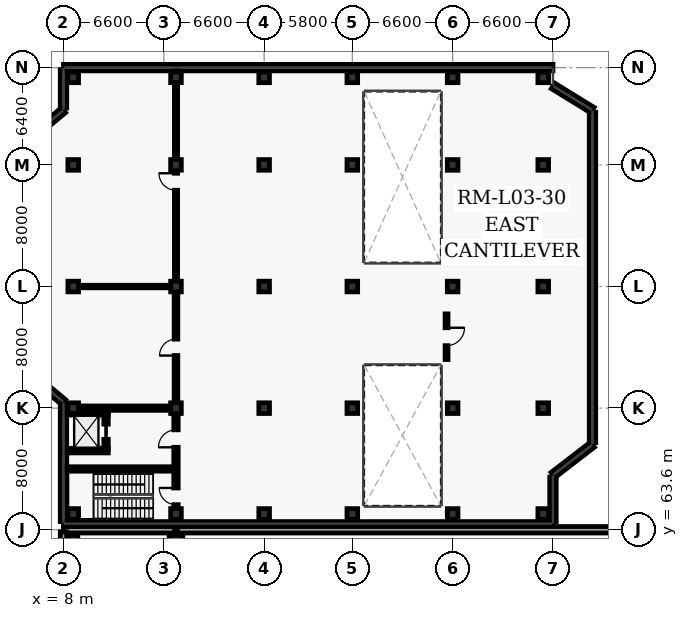
"""IFC4 building model, lengths in metres.
Left out: names, types, materials, properties, quantities, classifications, styles, units other than length and angle.
Written with IfcOpenShell. Run it as: python <this file> out.ifc"""

import sys

from ifc_helpers import new_model, si_unit, direction, frame, frame_2d, origin, origin_2d, place, context, subcontext, project, spatial, rectangle, extrude, element, fill, save


model = new_model("IFC4")
c1 = context("Model", 3, precision=1e-05, world=origin(), true_north=direction((0.0, 1.0)))
c2 = subcontext(c1, "Body", "Model", "MODEL_VIEW")
j1 = project(units=[si_unit("LENGTHUNIT", "METRE"), si_unit("PLANEANGLEUNIT", "RADIAN")], contexts=[c1])
p1 = place(None, origin())
s1 = spatial("IfcSite", under=j1, at=p1, CompositionType="ELEMENT")
p2 = place(p1, origin())
s2 = spatial("IfcBuilding", under=s1, at=p2, CompositionType="ELEMENT")
p3 = place(p2, frame((0.0, 0.0, 15.6)))
s3 = spatial("IfcBuildingStorey", under=s2, at=p3, CompositionType="ELEMENT", Elevation=15.6)
p4 = place(p3, frame((8.64, 62.96, 0.0), z_axis=(0.0, 0.0, 1.0), x_axis=(1.0, 0.0, 0.0)))
e1 = element("IfcColumn", 1, at=p4, inside=s3, PredefinedType="COLUMN", context=c2, shape_type="SweptSolid", body=[
    extrude(rectangle(XDim=0.6, YDim=0.6, at=origin_2d()), origin(), (0.0, 0.0, 1.0), 4.8),
])
p5 = place(p3, frame((15.4, 62.96, 0.0), z_axis=(0.0, 0.0, 1.0), x_axis=(1.0, 0.0, 0.0)))
e2 = element("IfcColumn", 2, at=p5, inside=s3, PredefinedType="COLUMN", context=c2, shape_type="SweptSolid", body=[
    extrude(rectangle(XDim=0.6, YDim=0.9, at=origin_2d()), origin(), (0.0, 0.0, 1.0), 4.8),
])
for number, where, z_axis, x_axis in (
    (3, (8.64, 64.64, 0.0), (0.0, 0.0, 1.0), (1.0, 0.0, 0.0)),
    (4, (8.64, 71.6, 0.0), (0.0, 0.0, 1.0), (1.0, 0.0, 0.0)),
    (5, (8.64, 79.6, 0.0), (0.0, 0.0, 1.0), (1.0, 0.0, 0.0)),
    (6, (8.64, 87.6, 0.0), (0.0, 0.0, 1.0), (1.0, 0.0, 0.0)),
    (7, (8.64, 93.36, 0.0), (0.0, 0.0, 1.0), (1.0, 0.0, 0.0)),
    (8, (15.4, 64.64, 0.0), (0.0, 0.0, 1.0), (1.0, 0.0, 0.0)),
    (9, (15.4, 71.6, 0.0), (0.0, 0.0, 1.0), (1.0, 0.0, 0.0)),
    (10, (15.4, 79.6, 0.0), (0.0, 0.0, 1.0), (1.0, 0.0, 0.0)),
    (11, (15.4, 87.6, 0.0), (0.0, 0.0, 1.0), (1.0, 0.0, 0.0)),
    (12, (15.4, 93.36, 0.0), (0.0, 0.0, 1.0), (1.0, 0.0, 0.0)),
    (13, (21.2, 64.64, 0.0), (0.0, 0.0, 1.0), (1.0, 0.0, 0.0)),
    (14, (21.2, 71.6, 0.0), (0.0, 0.0, 1.0), (1.0, 0.0, 0.0)),
    (15, (21.2, 79.6, 0.0), (0.0, 0.0, 1.0), (1.0, 0.0, 0.0)),
    (16, (21.2, 87.6, 0.0), (0.0, 0.0, 1.0), (1.0, 0.0, 0.0)),
    (17, (21.2, 93.36, 0.0), (0.0, 0.0, 1.0), (1.0, 0.0, 0.0)),
    (18, (27.0, 64.64, 0.0), (0.0, 0.0, 1.0), (1.0, 0.0, 0.0)),
    (19, (27.0, 71.6, 0.0), (0.0, 0.0, 1.0), (1.0, 0.0, 0.0)),
    (20, (27.0, 79.6, 0.0), (0.0, 0.0, 1.0), (1.0, 0.0, 0.0)),
    (21, (27.0, 87.6, 0.0), (0.0, 0.0, 1.0), (1.0, 0.0, 0.0)),
    (22, (27.0, 93.36, 0.0), (0.0, 0.0, 1.0), (1.0, 0.0, 0.0)),
    (23, (33.6, 64.64, 0.0), (0.0, 0.0, 1.0), (1.0, 0.0, 0.0)),
    (24, (33.6, 71.6, 0.0), (0.0, 0.0, 1.0), (1.0, 0.0, 0.0)),
    (25, (33.6, 79.6, 0.0), (0.0, 0.0, 1.0), (1.0, 0.0, 0.0)),
    (26, (33.6, 87.6, 0.0), (0.0, 0.0, 1.0), (1.0, 0.0, 0.0)),
    (27, (33.6, 93.36, 0.0), (0.0, 0.0, 1.0), (1.0, 0.0, 0.0)),
    (28, (39.56, 64.64, 0.0), (0.0, 0.0, 1.0), (1.0, 0.0, 0.0)),
    (29, (39.56, 71.6, 0.0), (0.0, 0.0, 1.0), (1.0, 0.0, 0.0)),
    (30, (39.56, 79.6, 0.0), (0.0, 0.0, 1.0), (1.0, 0.0, 0.0)),
    (31, (39.56, 87.6, 0.0), (0.0, 0.0, 1.0), (1.0, 0.0, 0.0)),
    (32, (39.56, 93.36, 0.0), (0.0, 0.0, 1.0), (1.0, 0.0, 0.0)),
):
    element("IfcColumn", number, at=place(p3, frame(where, z_axis=z_axis, x_axis=x_axis)), inside=s3, PredefinedType="COLUMN", context=c2, shape_type="SweptSolid", body=[
        extrude(rectangle(XDim=0.7, YDim=0.7, at=origin_2d()), origin(), (0.0, 0.0, 1.0), 4.8),
    ])
p6 = place(p3, frame((8.0, 63.6, 0.0), z_axis=(0.0, 0.0, 1.0), x_axis=(1.0, 0.0, 0.0)))
e33 = element("IfcWall", 33, at=p6, inside=s3, PredefinedType="SOLIDWALL", context=c2, shape_type="SweptSolid", body=[
    extrude(rectangle(XDim=38.0, YDim=0.425, at=frame_2d((19.0, 0.0))), origin(), (0.0, 0.0, 1.0), 4.555),
])
p7 = place(p3, frame((8.0, 7.74, 0.0), z_axis=(0.0, 0.0, 1.0), x_axis=(0.0, 1.0, 0.0)))
e34 = element("IfcWall", 34, at=p7, inside=s3, PredefinedType="SOLIDWALL", context=c2, shape_type="SweptSolid", body=[
    extrude(rectangle(XDim=55.72, YDim=0.425, at=frame_2d((27.86, 0.0))), origin(), (0.0, 0.0, 1.0), 4.555),
])
for number, where, z_axis, x_axis in (
    (35, (8.0, 72.0, 0.0), (0.0, 0.0, 1.0), (-0.768, 0.64, 0.0)),
    (36, (5.6, 89.2, 0.0), (0.0, 0.0, 1.0), (0.768, 0.64, 0.0)),
):
    element("IfcWall", number, at=place(p3, frame(where, z_axis=z_axis, x_axis=x_axis)), inside=s3, PredefinedType="SOLIDWALL", context=c2, shape_type="SweptSolid", body=[
        extrude(rectangle(XDim=3.124, YDim=0.425, at=frame_2d((1.562, 0.0))), origin(), (0.0, 0.0, 1.0), 4.55),
    ])
p8 = place(p3, frame((8.0, 91.34, 0.0), z_axis=(0.0, 0.0, 1.0), x_axis=(0.0, 1.0, 0.0)))
e37 = element("IfcWall", 37, at=p8, inside=s3, PredefinedType="SOLIDWALL", context=c2, shape_type="SweptSolid", body=[
    extrude(rectangle(XDim=2.52, YDim=0.425, at=frame_2d((1.26, 0.0))), origin(), (0.0, 0.0, 1.0), 4.55),
])
p9 = place(p3, frame((8.0, 94.0, 0.0), z_axis=(0.0, 0.0, 1.0), x_axis=(1.0, 0.0, 0.0)))
e38 = element("IfcWall", 38, at=p9, inside=s3, PredefinedType="SOLIDWALL", context=c2, shape_type="SweptSolid", body=[
    extrude(rectangle(XDim=32.2, YDim=0.425, at=frame_2d((16.1, 0.0))), origin(), (0.0, 0.0, 1.0), 4.55),
])
p10 = place(p3, frame((40.2, 92.8, 0.0), z_axis=(0.0, 0.0, 1.0), x_axis=(0.851652825334, -0.524106349037, 0.0)))
e39 = element("IfcWall", 39, at=p10, inside=s3, PredefinedType="SOLIDWALL", context=c2, shape_type="SweptSolid", body=[
    extrude(rectangle(XDim=3.053, YDim=0.425, at=frame_2d((1.526, 0.0))), origin(), (0.0, 0.0, 1.0), 4.55),
])
p11 = place(p3, frame((42.8, 91.06, 0.0), z_axis=(0.0, 0.0, 1.0), x_axis=(0.0, -1.0, 0.0)))
e40 = element("IfcWall", 40, at=p11, inside=s3, PredefinedType="SOLIDWALL", context=c2, shape_type="SweptSolid", body=[
    extrude(rectangle(XDim=21.72, YDim=0.425, at=frame_2d((10.86, 0.0))), origin(), (0.0, 0.0, 1.0), 4.55),
])
p12 = place(p3, frame((42.8, 69.2, 0.0), z_axis=(0.0, 0.0, 1.0), x_axis=(-0.792635056011, -0.609696373601, 0.0)))
e41 = element("IfcWall", 41, at=p12, inside=s3, PredefinedType="SOLIDWALL", context=c2, shape_type="SweptSolid", body=[
    extrude(rectangle(XDim=3.28, YDim=0.425, at=frame_2d((1.64, 0.0))), origin(), (0.0, 0.0, 1.0), 4.55),
])
p13 = place(p3, frame((40.2, 67.06, 0.0), z_axis=(0.0, 0.0, 1.0), x_axis=(0.0, -1.0, 0.0)))
e42 = element("IfcWall", 42, at=p13, inside=s3, PredefinedType="SOLIDWALL", context=c2, shape_type="SweptSolid", body=[
    extrude(rectangle(XDim=2.92, YDim=0.425, at=frame_2d((1.46, 0.0))), origin(), (0.0, 0.0, 1.0), 4.55),
])
p14 = place(p3, frame((40.2, 64.0, 0.0), z_axis=(0.0, 0.0, 1.0), x_axis=(-1.0, 0.0, 0.0)))
e43 = element("IfcWall", 43, at=p14, inside=s3, PredefinedType="SOLIDWALL", context=c2, shape_type="SweptSolid", body=[
    extrude(rectangle(XDim=32.2, YDim=0.275, at=frame_2d((16.1, 0.0))), origin(), (0.0, 0.0, 1.0), 4.55),
])
p15 = place(p3, frame((8.0, 64.14, 0.0), z_axis=(0.0, 0.0, 1.0), x_axis=(0.0, 1.0, 0.0)))
e44 = element("IfcWall", 44, at=p15, inside=s3, PredefinedType="SOLIDWALL", context=c2, shape_type="SweptSolid", body=[
    extrude(rectangle(XDim=7.72, YDim=0.425, at=frame_2d((3.86, 0.0))), origin(), (0.0, 0.0, 1.0), 4.55),
])
p16 = place(p3, frame((7.855, 71.6, 0.0), z_axis=(0.0, 0.0, 1.0), x_axis=(1.0, 0.0, 0.0)))
e45 = element("IfcWall", 45, at=p16, inside=s3, PredefinedType="SHEAR", context=c2, shape_type="SweptSolid", body=[
    extrude(rectangle(XDim=7.193, YDim=0.29, at=frame_2d((3.597, 0.0))), origin(), (0.0, 0.0, 1.0), 4.55),
])
p17 = place(p3, frame((15.4, 64.145, 0.0), z_axis=(0.0, 0.0, 1.0), x_axis=(0.0, 1.0, 0.0)))
e46 = element("IfcWall", 46, at=p17, inside=s3, PredefinedType="SHEAR", context=c2, shape_type="SweptSolid", body=[
    extrude(rectangle(XDim=7.103, YDim=0.29, at=frame_2d((3.552, 0.0))), origin(), (0.0, 0.0, 1.0), 4.55),
])
p18 = place(p17, frame((1.105, 0.0, 0.0)))
e47 = element("IfcOpeningElement", 47, at=p18, cuts=e46, PredefinedType="OPENING", context=c2, shape_type="SweptSolid", body=[
    extrude(rectangle(XDim=1.1, YDim=2.15, at=frame_2d((0.55, 1.075))), frame((0.0, 0.155, 0.0), z_axis=(0.0, -1.0, 0.0), x_axis=(1.0, 0.0, 0.0)), (0.0, 0.0, 1.0), 0.31),
])
p19 = place(p17, frame((4.88, 0.0, 0.0)))
e48 = element("IfcOpeningElement", 48, at=p19, cuts=e46, PredefinedType="OPENING", context=c2, shape_type="SweptSolid", body=[
    extrude(rectangle(XDim=1.15, YDim=2.2, at=frame_2d((0.575, 1.1))), frame((0.0, 0.155, 0.0), z_axis=(0.0, -1.0, 0.0), x_axis=(1.0, 0.0, 0.0)), (0.0, 0.0, 1.0), 0.31),
])
p20 = place(p3, frame((8.145, 67.6, 0.0), z_axis=(0.0, 0.0, 1.0), x_axis=(1.0, 0.0, 0.0)))
e49 = element("IfcWall", 49, at=p20, inside=s3, PredefinedType="SHEAR", context=c2, shape_type="SweptSolid", body=[
    extrude(rectangle(XDim=7.11, YDim=0.29, at=frame_2d((3.555, 0.0))), origin(), (0.0, 0.0, 1.0), 4.55),
])
for number, where, z_axis, x_axis in (
    (50, (8.055, 68.8, 0.0), (0.0, 0.0, 1.0), (1.0, 0.0, 0.0)),
    (51, (8.055, 71.3, 0.0), (0.0, 0.0, 1.0), (1.0, 0.0, 0.0)),
):
    element("IfcWall", number, at=place(p3, frame(where, z_axis=z_axis, x_axis=x_axis)), inside=s3, PredefinedType="SHEAR", context=c2, shape_type="SweptSolid", body=[
        extrude(rectangle(XDim=2.89, YDim=0.29, at=frame_2d((1.445, 0.0))), origin(), (0.0, 0.0, 1.0), 4.55),
    ])
p21 = place(p3, frame((10.8, 68.945, 0.0), z_axis=(0.0, 0.0, 1.0), x_axis=(0.0, 1.0, 0.0)))
e52 = element("IfcWall", 52, at=p21, inside=s3, PredefinedType="SHEAR", context=c2, shape_type="SweptSolid", body=[
    extrude(rectangle(XDim=2.21, YDim=0.29, at=frame_2d((1.105, 0.0))), origin(), (0.0, 0.0, 1.0), 4.55),
])
p22 = place(p21, frame((0.605, 0.0, 0.0)))
e53 = element("IfcOpeningElement", 53, at=p22, cuts=e52, PredefinedType="OPENING", context=c2, shape_type="SweptSolid", body=[
    extrude(rectangle(XDim=1.0, YDim=2.15, at=frame_2d((0.5, 1.075))), frame((0.0, 0.155, 0.0), z_axis=(0.0, -1.0, 0.0), x_axis=(1.0, 0.0, 0.0)), (0.0, 0.0, 1.0), 0.31),
])
p23 = place(p3, frame((15.4, 46.0, 0.0), z_axis=(0.0, 0.0, 1.0), x_axis=(0.0, 1.0, 0.0)))
e54 = element("IfcWall", 54, at=p23, inside=s3, PredefinedType="PARTITIONING", context=c2, shape_type="SweptSolid", body=[
    extrude(rectangle(XDim=17.6, YDim=0.19, at=frame_2d((8.8, 0.0))), origin(), (0.0, 0.0, 1.0), 2.732),
])
p24 = place(p23, frame((7.98, 0.0, 0.0)))
e55 = element("IfcOpeningElement", 55, at=p24, cuts=e54, PredefinedType="OPENING", context=c2, shape_type="SweptSolid", body=[
    extrude(rectangle(XDim=0.98, YDim=2.1, at=frame_2d((0.49, 1.05))), frame((0.0, 0.105, 0.0), z_axis=(0.0, -1.0, 0.0), x_axis=(1.0, 0.0, 0.0)), (0.0, 0.0, 1.0), 0.21),
])
p25 = place(p3, frame((15.4, 71.952, 0.0), z_axis=(0.0, 0.0, 1.0), x_axis=(0.0, 1.0, 0.0)))
e56 = element("IfcWall", 56, at=p25, inside=s3, PredefinedType="PARTITIONING", context=c2, shape_type="SweptSolid", body=[
    extrude(rectangle(XDim=7.296, YDim=0.24, at=frame_2d((3.648, 0.0))), origin(), (0.0, 0.0, 1.0), 3.7),
])
p26 = place(p25, frame((3.108, 0.0, 0.0)))
e57 = element("IfcOpeningElement", 57, at=p26, cuts=e56, PredefinedType="OPENING", context=c2, shape_type="SweptSolid", body=[
    extrude(rectangle(XDim=1.08, YDim=2.15, at=frame_2d((0.54, 1.075))), frame((0.0, 0.13, 0.0), z_axis=(0.0, -1.0, 0.0), x_axis=(1.0, 0.0, 0.0)), (0.0, 0.0, 1.0), 0.26),
])
p27 = place(p3, frame((15.4, 79.952, 0.0), z_axis=(0.0, 0.0, 1.0), x_axis=(0.0, 1.0, 0.0)))
e58 = element("IfcWall", 58, at=p27, inside=s3, PredefinedType="PARTITIONING", context=c2, shape_type="SweptSolid", body=[
    extrude(rectangle(XDim=14.048, YDim=0.21, at=frame_2d((7.024, 0.0))), origin(), (0.0, 0.0, 1.0), 3.7),
])
p28 = place(p27, frame((5.98, 0.0, 0.0)))
e59 = element("IfcOpeningElement", 59, at=p28, cuts=e58, PredefinedType="OPENING", context=c2, shape_type="SweptSolid", body=[
    extrude(rectangle(XDim=1.12, YDim=2.15, at=frame_2d((0.56, 1.075))), frame((0.0, 0.115, 0.0), z_axis=(0.0, -1.0, 0.0), x_axis=(1.0, 0.0, 0.0)), (0.0, 0.0, 1.0), 0.23),
])
p29 = place(p3, frame((33.2, 77.8, 0.0), z_axis=(0.0, 0.0, 1.0), x_axis=(0.0, -1.0, 0.0)))
e60 = element("IfcWall", 60, at=p29, inside=s3, PredefinedType="PARTITIONING", context=c2, shape_type="SweptSolid", body=[
    extrude(rectangle(XDim=3.0, YDim=0.19, at=frame_2d((1.5, 0.0))), origin(), (0.0, 0.0, 1.0), 3.7),
])
p30 = place(p29, frame((0.91, 0.0, 0.0)))
e61 = element("IfcOpeningElement", 61, at=p30, cuts=e60, PredefinedType="OPENING", context=c2, shape_type="SweptSolid", body=[
    extrude(rectangle(XDim=1.18, YDim=2.15, at=frame_2d((0.59, 1.075))), frame((0.0, 0.105, 0.0), z_axis=(0.0, -1.0, 0.0), x_axis=(1.0, 0.0, 0.0)), (0.0, 0.0, 1.0), 0.21),
])
p31 = place(p3, frame((8.992, 79.6, 0.0), z_axis=(0.0, 0.0, 1.0), x_axis=(1.0, 0.0, 0.0)))
e62 = element("IfcWall", 62, at=p31, inside=s3, PredefinedType="PARTITIONING", context=c2, shape_type="SweptSolid", body=[
    extrude(rectangle(XDim=6.056, YDim=0.165, at=frame_2d((3.028, 0.0))), origin(), (0.0, 0.0, 1.0), 3.165),
])
p32 = place(p18, origin())
e63 = element("IfcDoor", 63, at=p32, inside=s3, OperationType="SINGLE_SWING_RIGHT", PredefinedType="DOOR", context=c2, shape_type="SweptSolid", body=[
    extrude(rectangle(XDim=1.1, YDim=2.15, at=frame_2d((0.55, 1.075))), frame((0.0, 0.025, 0.0), z_axis=(0.0, -1.0, 0.0), x_axis=(1.0, 0.0, 0.0)), (0.0, 0.0, 1.0), 0.05),
])
fill(e47, e63)
p33 = place(p19, origin())
e64 = element("IfcDoor", 64, at=p33, inside=s3, OperationType="SINGLE_SWING_LEFT", PredefinedType="DOOR", context=c2, shape_type="SweptSolid", body=[
    extrude(rectangle(XDim=1.15, YDim=2.2, at=frame_2d((0.575, 1.1))), frame((0.0, 0.025, 0.0), z_axis=(0.0, -1.0, 0.0), x_axis=(1.0, 0.0, 0.0)), (0.0, 0.0, 1.0), 0.05),
])
fill(e48, e64)
p34 = place(p22, origin())
e65 = element("IfcDoor", 65, at=p34, inside=s3, OperationType="SLIDING_TO_LEFT", PredefinedType="DOOR", context=c2, shape_type="SweptSolid", body=[
    extrude(rectangle(XDim=1.0, YDim=2.15, at=frame_2d((0.5, 1.075))), frame((0.0, 0.025, 0.0), z_axis=(0.0, -1.0, 0.0), x_axis=(1.0, 0.0, 0.0)), (0.0, 0.0, 1.0), 0.05),
])
fill(e53, e65)
p35 = place(p26, origin())
e66 = element("IfcDoor", 66, at=p35, inside=s3, OperationType="SINGLE_SWING_LEFT", PredefinedType="DOOR", context=c2, shape_type="SweptSolid", body=[
    extrude(rectangle(XDim=1.08, YDim=2.15, at=frame_2d((0.54, 1.075))), frame((0.0, 0.025, 0.0), z_axis=(0.0, -1.0, 0.0), x_axis=(1.0, 0.0, 0.0)), (0.0, 0.0, 1.0), 0.05),
])
fill(e57, e66)
p36 = place(p28, origin())
e67 = element("IfcDoor", 67, at=p36, inside=s3, OperationType="SINGLE_SWING_RIGHT", PredefinedType="DOOR", context=c2, shape_type="SweptSolid", body=[
    extrude(rectangle(XDim=1.12, YDim=2.15, at=frame_2d((0.56, 1.075))), frame((0.0, 0.025, 0.0), z_axis=(0.0, -1.0, 0.0), x_axis=(1.0, 0.0, 0.0)), (0.0, 0.0, 1.0), 0.05),
])
fill(e59, e67)
p37 = place(p30, origin())
e68 = element("IfcDoor", 68, at=p37, inside=s3, OperationType="SINGLE_SWING_LEFT", PredefinedType="DOOR", context=c2, shape_type="SweptSolid", body=[
    extrude(rectangle(XDim=1.18, YDim=2.15, at=frame_2d((0.59, 1.075))), frame((0.0, 0.025, 0.0), z_axis=(0.0, -1.0, 0.0), x_axis=(1.0, 0.0, 0.0)), (0.0, 0.0, 1.0), 0.05),
])
fill(e61, e68)
save(model, sys.argv[1])
